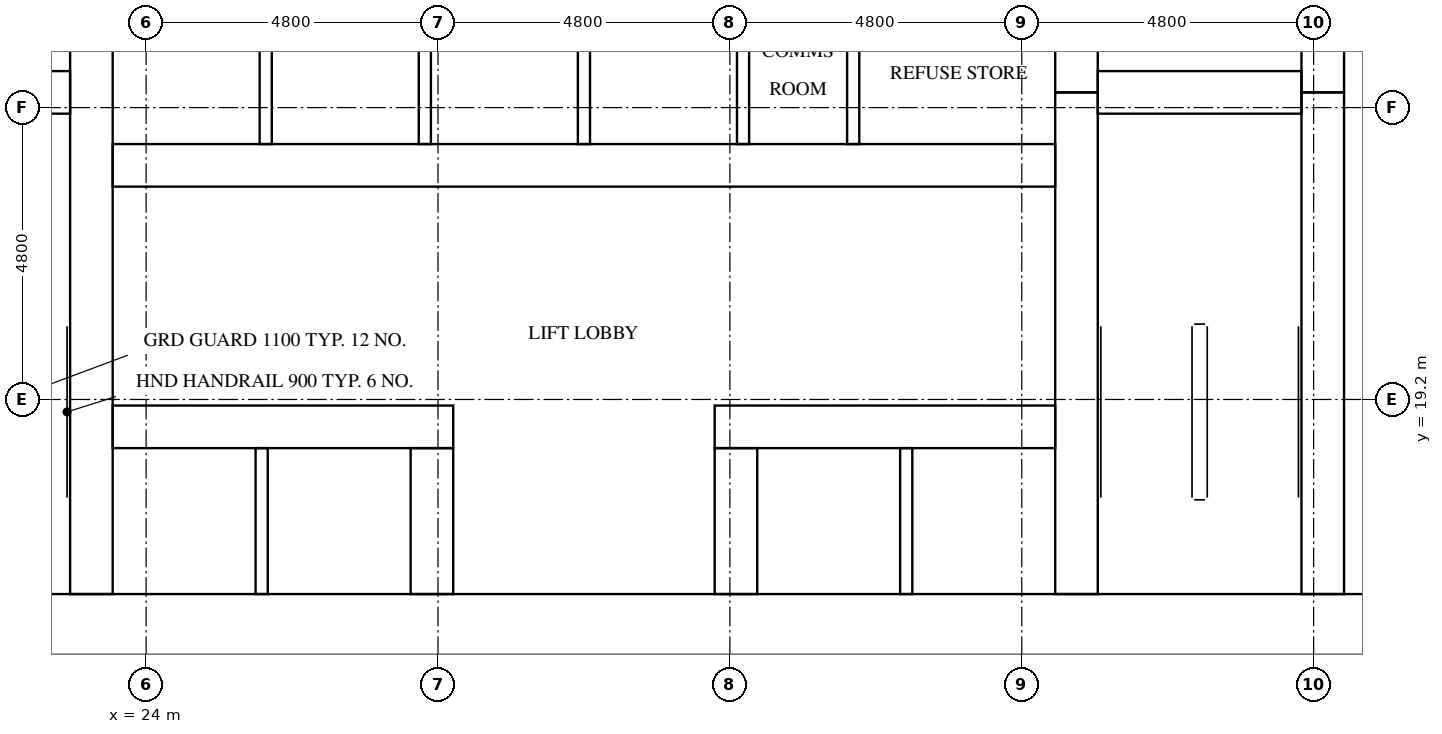
"""IFC4 building model, lengths in metres.
Left out: names, types, materials, properties, quantities, classifications, styles, units other than length and angle.
Written with IfcOpenShell. Run it as: python <this file> out.ifc"""

import sys

from ifc_helpers import new_model, si_unit, direction, frame, frame_2d, origin, place, context, subcontext, project, spatial, rectangle, extrude, element, fill, save


model = new_model("IFC4")
c1 = context("Model", 3, precision=1e-05, world=origin(), true_north=direction((0.0, 1.0)))
c2 = subcontext(c1, "Body", "Model", "MODEL_VIEW")
j1 = project(units=[si_unit("LENGTHUNIT", "METRE"), si_unit("PLANEANGLEUNIT", "RADIAN")], contexts=[c1])
p1 = place(None, origin())
s1 = spatial("IfcSite", under=j1, at=p1, CompositionType="ELEMENT")
p2 = place(p1, origin())
s2 = spatial("IfcBuilding", under=s1, at=p2, CompositionType="ELEMENT")
p3 = place(p2, frame((0.0, 0.0, 32.9)))
s3 = spatial("IfcBuildingStorey", under=s2, at=p3, CompositionType="ELEMENT", Elevation=32.9)
p4 = place(p3, frame((15.0, 15.5, 0.0), z_axis=(0.0, 0.0, 1.0), x_axis=(1.0, 0.0, 0.0)))
e1 = element("IfcWall", 1, at=p4, inside=s3, PredefinedType="SHEAR", context=c2, shape_type="SweptSolid", body=[
    extrude(rectangle(XDim=32.4, YDim=1.0, at=frame_2d((16.2, 0.0))), origin(), (0.0, 0.0, 1.0), 3.2),
])
p5 = place(p4, frame((15.3, 0.0, 0.0)))
e2 = element("IfcOpeningElement", 2, at=p5, cuts=e1, PredefinedType="OPENING", context=c2, shape_type="SweptSolid", body=[
    extrude(rectangle(XDim=1.8, YDim=2.1, at=frame_2d((0.9, 1.05))), frame((0.0, 0.51, 0.0), z_axis=(0.0, -1.0, 0.0), x_axis=(1.0, 0.0, 0.0)), (0.0, 0.0, 1.0), 1.02),
])
p6 = place(p3, frame((23.1, 16.0, 0.0), z_axis=(0.0, 0.0, 1.0), x_axis=(0.0, 1.0, 0.0)))
e3 = element("IfcWall", 3, at=p6, inside=s3, PredefinedType="SHEAR", context=c2, shape_type="SweptSolid", body=[
    extrude(rectangle(XDim=20.8, YDim=0.7, at=frame_2d((10.4, 0.0))), origin(), (0.0, 0.0, 1.0), 3.2),
])
p7 = place(p3, frame((39.3, 16.0, 0.0), z_axis=(0.0, 0.0, 1.0), x_axis=(0.0, 1.0, 0.0)))
e4 = element("IfcWall", 4, at=p7, inside=s3, PredefinedType="SHEAR", context=c2, shape_type="SweptSolid", body=[
    extrude(rectangle(XDim=8.25, YDim=0.7, at=frame_2d((4.125, 0.0))), origin(), (0.0, 0.0, 1.0), 3.2),
])
p8 = place(p3, frame((39.3, 24.25, 0.0), z_axis=(0.0, 0.0, 1.0), x_axis=(0.0, 1.0, 0.0)))
e5 = element("IfcWall", 5, at=p8, inside=s3, PredefinedType="SHEAR", context=c2, shape_type="SweptSolid", body=[
    extrude(rectangle(XDim=3.5, YDim=0.7, at=frame_2d((1.75, 0.0))), origin(), (0.0, 0.0, 1.0), 3.2),
])
p9 = place(p3, frame((43.35, 16.0, 0.0), z_axis=(0.0, 0.0, 1.0), x_axis=(0.0, 1.0, 0.0)))
e6 = element("IfcWall", 6, at=p9, inside=s3, PredefinedType="SHEAR", context=c2, shape_type="SweptSolid", body=[
    extrude(rectangle(XDim=8.25, YDim=0.7, at=frame_2d((4.125, 0.0))), origin(), (0.0, 0.0, 1.0), 3.2),
])
p10 = place(p9, frame((0.2, 0.0, 0.0)))
e7 = element("IfcOpeningElement", 7, at=p10, cuts=e6, PredefinedType="OPENING", context=c2, shape_type="SweptSolid", body=[
    extrude(rectangle(XDim=1.2, YDim=2.1, at=frame_2d((0.6, 1.05))), frame((0.0, 0.36, 0.0), z_axis=(0.0, -1.0, 0.0), x_axis=(1.0, 0.0, 0.0)), (0.0, 0.0, 1.0), 0.72),
])
p11 = place(p3, frame((43.35, 24.25, 0.0), z_axis=(0.0, 0.0, 1.0), x_axis=(0.0, 1.0, 0.0)))
e8 = element("IfcWall", 8, at=p11, inside=s3, PredefinedType="SHEAR", context=c2, shape_type="SweptSolid", body=[
    extrude(rectangle(XDim=3.5, YDim=0.7, at=frame_2d((1.75, 0.0))), origin(), (0.0, 0.0, 1.0), 3.2),
])
p12 = place(p11, frame((1.2, 0.0, 0.0)))
e9 = element("IfcOpeningElement", 9, at=p12, cuts=e8, PredefinedType="OPENING", context=c2, shape_type="SweptSolid", body=[
    extrude(rectangle(XDim=1.1, YDim=2.1, at=frame_2d((0.55, 1.05))), frame((0.0, 0.36, 0.0), z_axis=(0.0, -1.0, 0.0), x_axis=(1.0, 0.0, 0.0)), (0.0, 0.0, 1.0), 0.72),
])
for number, where, z_axis, x_axis in (
    (10, (19.4, 24.25, 0.0), (0.0, 0.0, 1.0), (1.0, 0.0, 0.0)),
    (11, (39.65, 24.25, 0.0), (0.0, 0.0, 1.0), (1.0, 0.0, 0.0)),
):
    element("IfcWall", number, at=place(p3, frame(where, z_axis=z_axis, x_axis=x_axis)), inside=s3, PredefinedType="SHEAR", context=c2, shape_type="SweptSolid", body=[
        extrude(rectangle(XDim=3.35, YDim=0.7, at=frame_2d((1.675, 0.0))), origin(), (0.0, 0.0, 1.0), 3.2),
    ])
p13 = place(p3, frame((23.45, 18.75, 0.0), z_axis=(0.0, 0.0, 1.0), x_axis=(1.0, 0.0, 0.0)))
e12 = element("IfcWall", 12, at=p13, inside=s3, PredefinedType="SHEAR", context=c2, shape_type="SweptSolid", body=[
    extrude(rectangle(XDim=5.6, YDim=0.7, at=frame_2d((2.8, 0.0))), origin(), (0.0, 0.0, 1.0), 3.2),
])
p14 = place(p13, frame((0.625, 0.0, 0.0)))
e13 = element("IfcOpeningElement", 13, at=p14, cuts=e12, PredefinedType="OPENING", context=c2, shape_type="SweptSolid", body=[
    extrude(rectangle(XDim=1.1, YDim=2.1, at=frame_2d((0.55, 1.05))), frame((0.0, 0.36, 0.0), z_axis=(0.0, -1.0, 0.0), x_axis=(1.0, 0.0, 0.0)), (0.0, 0.0, 1.0), 0.72),
])
p15 = place(p13, frame((3.175, 0.0, 0.0)))
e14 = element("IfcOpeningElement", 14, at=p15, cuts=e12, PredefinedType="OPENING", context=c2, shape_type="SweptSolid", body=[
    extrude(rectangle(XDim=1.1, YDim=2.1, at=frame_2d((0.55, 1.05))), frame((0.0, 0.36, 0.0), z_axis=(0.0, -1.0, 0.0), x_axis=(1.0, 0.0, 0.0)), (0.0, 0.0, 1.0), 0.72),
])
p16 = place(p3, frame((33.35, 18.75, 0.0), z_axis=(0.0, 0.0, 1.0), x_axis=(1.0, 0.0, 0.0)))
e15 = element("IfcWall", 15, at=p16, inside=s3, PredefinedType="SHEAR", context=c2, shape_type="SweptSolid", body=[
    extrude(rectangle(XDim=5.6, YDim=0.7, at=frame_2d((2.8, 0.0))), origin(), (0.0, 0.0, 1.0), 3.2),
])
p17 = place(p16, frame((1.325, 0.0, 0.0)))
e16 = element("IfcOpeningElement", 16, at=p17, cuts=e15, PredefinedType="OPENING", context=c2, shape_type="SweptSolid", body=[
    extrude(rectangle(XDim=1.1, YDim=2.1, at=frame_2d((0.55, 1.05))), frame((0.0, 0.36, 0.0), z_axis=(0.0, -1.0, 0.0), x_axis=(1.0, 0.0, 0.0)), (0.0, 0.0, 1.0), 0.72),
])
p18 = place(p16, frame((3.875, 0.0, 0.0)))
e17 = element("IfcOpeningElement", 17, at=p18, cuts=e15, PredefinedType="OPENING", context=c2, shape_type="SweptSolid", body=[
    extrude(rectangle(XDim=1.1, YDim=2.1, at=frame_2d((0.55, 1.05))), frame((0.0, 0.36, 0.0), z_axis=(0.0, -1.0, 0.0), x_axis=(1.0, 0.0, 0.0)), (0.0, 0.0, 1.0), 0.72),
])
p19 = place(p3, frame((23.45, 23.05, 0.0), z_axis=(0.0, 0.0, 1.0), x_axis=(1.0, 0.0, 0.0)))
e18 = element("IfcWall", 18, at=p19, inside=s3, PredefinedType="SHEAR", context=c2, shape_type="SweptSolid", body=[
    extrude(rectangle(XDim=15.5, YDim=0.7, at=frame_2d((7.75, 0.0))), origin(), (0.0, 0.0, 1.0), 3.2),
])
p20 = place(p19, frame((0.658, 0.0, 0.0)))
e19 = element("IfcOpeningElement", 19, at=p20, cuts=e18, PredefinedType="OPENING", context=c2, shape_type="SweptSolid", body=[
    extrude(rectangle(XDim=1.1, YDim=2.1, at=frame_2d((0.55, 1.05))), frame((0.0, 0.36, 0.0), z_axis=(0.0, -1.0, 0.0), x_axis=(1.0, 0.0, 0.0)), (0.0, 0.0, 1.0), 0.72),
])
p21 = place(p19, frame((3.275, 0.0, 0.0)))
e20 = element("IfcOpeningElement", 20, at=p21, cuts=e18, PredefinedType="OPENING", context=c2, shape_type="SweptSolid", body=[
    extrude(rectangle(XDim=1.1, YDim=2.1, at=frame_2d((0.55, 1.05))), frame((0.0, 0.36, 0.0), z_axis=(0.0, -1.0, 0.0), x_axis=(1.0, 0.0, 0.0)), (0.0, 0.0, 1.0), 0.72),
])
p22 = place(p19, frame((10.772, 0.0, 0.0)))
e21 = element("IfcOpeningElement", 21, at=p22, cuts=e18, PredefinedType="OPENING", context=c2, shape_type="SweptSolid", body=[
    extrude(rectangle(XDim=1.0, YDim=2.1, at=frame_2d((0.5, 1.05))), frame((0.0, 0.36, 0.0), z_axis=(0.0, -1.0, 0.0), x_axis=(1.0, 0.0, 0.0)), (0.0, 0.0, 1.0), 0.72),
])
p23 = place(p19, frame((13.389, 0.0, 0.0)))
e22 = element("IfcOpeningElement", 22, at=p23, cuts=e18, PredefinedType="OPENING", context=c2, shape_type="SweptSolid", body=[
    extrude(rectangle(XDim=1.0, YDim=2.1, at=frame_2d((0.5, 1.05))), frame((0.0, 0.36, 0.0), z_axis=(0.0, -1.0, 0.0), x_axis=(1.0, 0.0, 0.0)), (0.0, 0.0, 1.0), 0.72),
])
for number, where, z_axis, x_axis in (
    (23, (28.7, 16.0, 0.0), (0.0, 0.0, 1.0), (0.0, 1.0, 0.0)),
    (24, (33.7, 16.0, 0.0), (0.0, 0.0, 1.0), (0.0, 1.0, 0.0)),
):
    element("IfcWall", number, at=place(p3, frame(where, z_axis=z_axis, x_axis=x_axis)), inside=s3, PredefinedType="SHEAR", context=c2, shape_type="SweptSolid", body=[
        extrude(rectangle(XDim=2.4, YDim=0.7, at=frame_2d((1.2, 0.0))), origin(), (0.0, 0.0, 1.0), 3.2),
    ])
for number, where, z_axis, x_axis in (
    (25, (25.967, 23.4, 0.0), (0.0, 0.0, 1.0), (0.0, 1.0, 0.0)),
    (26, (28.583, 23.4, 0.0), (0.0, 0.0, 1.0), (0.0, 1.0, 0.0)),
    (27, (31.2, 23.4, 0.0), (0.0, 0.0, 1.0), (0.0, 1.0, 0.0)),
    (28, (33.817, 23.4, 0.0), (0.0, 0.0, 1.0), (0.0, 1.0, 0.0)),
):
    element("IfcWall", number, at=place(p3, frame(where, z_axis=z_axis, x_axis=x_axis)), inside=s3, PredefinedType="SOLIDWALL", context=c2, shape_type="SweptSolid", body=[
        extrude(rectangle(XDim=2.4, YDim=0.2, at=frame_2d((1.2, 0.0))), origin(), (0.0, 0.0, 1.0), 3.2),
    ])
for number, where, z_axis, x_axis in (
    (29, (25.9, 16.0, 0.0), (0.0, 0.0, 1.0), (0.0, 1.0, 0.0)),
    (30, (36.5, 16.0, 0.0), (0.0, 0.0, 1.0), (0.0, 1.0, 0.0)),
):
    element("IfcWall", number, at=place(p3, frame(where, z_axis=z_axis, x_axis=x_axis)), inside=s3, PredefinedType="SOLIDWALL", context=c2, shape_type="SweptSolid", body=[
        extrude(rectangle(XDim=2.4, YDim=0.2, at=frame_2d((1.2, 0.0))), origin(), (0.0, 0.0, 1.0), 3.2),
    ])
p24 = place(p3, frame((35.628, 23.4, 0.0), z_axis=(0.0, 0.0, 1.0), x_axis=(0.0, 1.0, 0.0)))
e31 = element("IfcWall", 31, at=p24, inside=s3, PredefinedType="PARTITIONING", context=c2, shape_type="SweptSolid", body=[
    extrude(rectangle(XDim=2.4, YDim=0.2, at=frame_2d((1.2, 0.0))), origin(), (0.0, 0.0, 1.0), 3.2),
])
p25 = place(p14, origin())
e32 = element("IfcDoor", 32, at=p25, inside=s3, OperationType="DOUBLE_DOOR_SLIDING", PredefinedType="DOOR", context=c2, shape_type="SweptSolid", body=[
    extrude(rectangle(XDim=1.1, YDim=2.1, at=frame_2d((0.55, 1.05))), frame((0.0, 0.025, 0.0), z_axis=(0.0, -1.0, 0.0), x_axis=(1.0, 0.0, 0.0)), (0.0, 0.0, 1.0), 0.05),
])
fill(e13, e32)
p26 = place(p15, origin())
e33 = element("IfcDoor", 33, at=p26, inside=s3, OperationType="DOUBLE_DOOR_SLIDING", PredefinedType="DOOR", context=c2, shape_type="SweptSolid", body=[
    extrude(rectangle(XDim=1.1, YDim=2.1, at=frame_2d((0.55, 1.05))), frame((0.0, 0.025, 0.0), z_axis=(0.0, -1.0, 0.0), x_axis=(1.0, 0.0, 0.0)), (0.0, 0.0, 1.0), 0.05),
])
fill(e14, e33)
p27 = place(p17, origin())
e34 = element("IfcDoor", 34, at=p27, inside=s3, OperationType="DOUBLE_DOOR_SLIDING", PredefinedType="DOOR", context=c2, shape_type="SweptSolid", body=[
    extrude(rectangle(XDim=1.1, YDim=2.1, at=frame_2d((0.55, 1.05))), frame((0.0, 0.025, 0.0), z_axis=(0.0, -1.0, 0.0), x_axis=(1.0, 0.0, 0.0)), (0.0, 0.0, 1.0), 0.05),
])
fill(e16, e34)
p28 = place(p18, origin())
e35 = element("IfcDoor", 35, at=p28, inside=s3, OperationType="DOUBLE_DOOR_SLIDING", PredefinedType="DOOR", context=c2, shape_type="SweptSolid", body=[
    extrude(rectangle(XDim=1.1, YDim=2.1, at=frame_2d((0.55, 1.05))), frame((0.0, 0.025, 0.0), z_axis=(0.0, -1.0, 0.0), x_axis=(1.0, 0.0, 0.0)), (0.0, 0.0, 1.0), 0.05),
])
fill(e17, e35)
p29 = place(p20, origin())
e36 = element("IfcDoor", 36, at=p29, inside=s3, OperationType="DOUBLE_DOOR_SLIDING", PredefinedType="DOOR", context=c2, shape_type="SweptSolid", body=[
    extrude(rectangle(XDim=1.1, YDim=2.1, at=frame_2d((0.55, 1.05))), frame((0.0, 0.025, 0.0), z_axis=(0.0, -1.0, 0.0), x_axis=(1.0, 0.0, 0.0)), (0.0, 0.0, 1.0), 0.05),
])
fill(e19, e36)
p30 = place(p21, origin())
e37 = element("IfcDoor", 37, at=p30, inside=s3, OperationType="DOUBLE_DOOR_SLIDING", PredefinedType="DOOR", context=c2, shape_type="SweptSolid", body=[
    extrude(rectangle(XDim=1.1, YDim=2.1, at=frame_2d((0.55, 1.05))), frame((0.0, 0.025, 0.0), z_axis=(0.0, -1.0, 0.0), x_axis=(1.0, 0.0, 0.0)), (0.0, 0.0, 1.0), 0.05),
])
fill(e20, e37)
p31 = place(p10, origin())
e38 = element("IfcDoor", 38, at=p31, inside=s3, OperationType="SINGLE_SWING_RIGHT", PredefinedType="DOOR", context=c2, shape_type="SweptSolid", body=[
    extrude(rectangle(XDim=1.2, YDim=2.1, at=frame_2d((0.6, 1.05))), frame((0.0, 0.025, 0.0), z_axis=(0.0, -1.0, 0.0), x_axis=(1.0, 0.0, 0.0)), (0.0, 0.0, 1.0), 0.05),
])
fill(e7, e38)
p32 = place(p5, frame((1.8, 0.0, 0.0), z_axis=(0.0, 0.0, 1.0), x_axis=(-1.0, 0.0, 0.0)))
e39 = element("IfcDoor", 39, at=p32, inside=s3, OperationType="DOUBLE_DOOR_SINGLE_SWING", PredefinedType="DOOR", context=c2, shape_type="SweptSolid", body=[
    extrude(rectangle(XDim=1.8, YDim=2.1, at=frame_2d((0.9, 1.05))), frame((0.0, 0.025, 0.0), z_axis=(0.0, -1.0, 0.0), x_axis=(1.0, 0.0, 0.0)), (0.0, 0.0, 1.0), 0.05),
])
fill(e2, e39)
p33 = place(p22, frame((1.0, 0.0, 0.0), z_axis=(0.0, 0.0, 1.0), x_axis=(-1.0, 0.0, 0.0)))
e40 = element("IfcDoor", 40, at=p33, inside=s3, OperationType="SINGLE_SWING_RIGHT", PredefinedType="DOOR", context=c2, shape_type="SweptSolid", body=[
    extrude(rectangle(XDim=1.0, YDim=2.1, at=frame_2d((0.5, 1.05))), frame((0.0, 0.025, 0.0), z_axis=(0.0, -1.0, 0.0), x_axis=(1.0, 0.0, 0.0)), (0.0, 0.0, 1.0), 0.05),
])
fill(e21, e40)
p34 = place(p23, frame((1.0, 0.0, 0.0), z_axis=(0.0, 0.0, 1.0), x_axis=(-1.0, 0.0, 0.0)))
e41 = element("IfcDoor", 41, at=p34, inside=s3, OperationType="SINGLE_SWING_LEFT", PredefinedType="DOOR", context=c2, shape_type="SweptSolid", body=[
    extrude(rectangle(XDim=1.0, YDim=2.1, at=frame_2d((0.5, 1.05))), frame((0.0, 0.025, 0.0), z_axis=(0.0, -1.0, 0.0), x_axis=(1.0, 0.0, 0.0)), (0.0, 0.0, 1.0), 0.05),
])
fill(e22, e41)
save(model, sys.argv[1])
